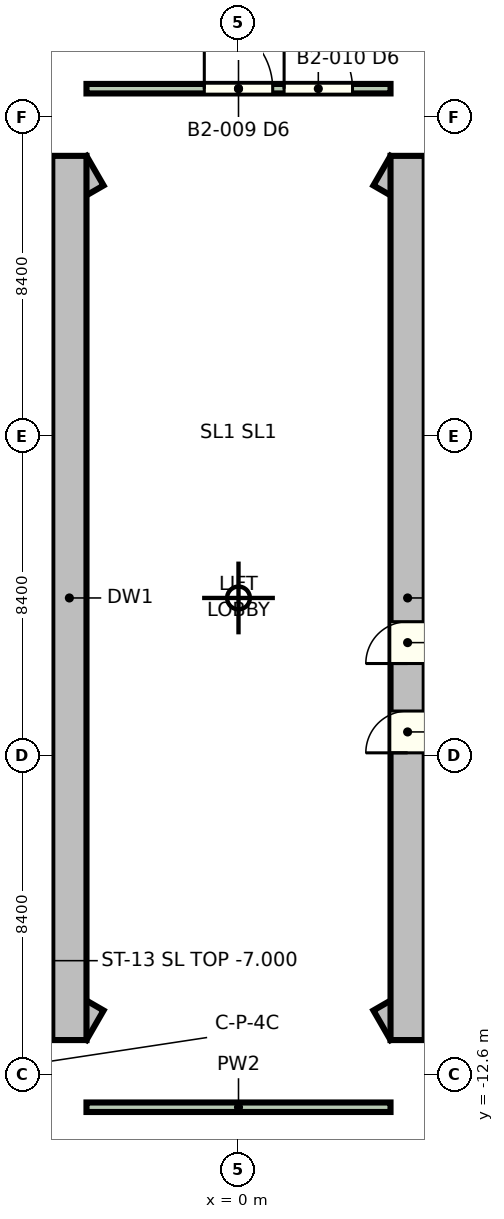
"""IFC4 building model, lengths in metres.
Left out: names, types, materials, properties, quantities, classifications, styles, units other than length and angle.
Written with IfcOpenShell. Run it as: python <this file> out.ifc"""

import sys

from ifc_helpers import new_model, si_unit, direction, frame, frame_2d, origin, place, context, subcontext, project, spatial, rectangle, extrude, element, fill, save


model = new_model("IFC4")
c1 = context("Model", 3, precision=1e-05, world=origin(), true_north=direction((0.0, 1.0)))
c2 = subcontext(c1, "Body", "Model", "MODEL_VIEW")
j1 = project(units=[si_unit("LENGTHUNIT", "METRE"), si_unit("PLANEANGLEUNIT", "RADIAN")], contexts=[c1])
p1 = place(None, origin())
s1 = spatial("IfcSite", under=j1, at=p1, CompositionType="ELEMENT")
p2 = place(p1, origin())
s2 = spatial("IfcBuilding", under=s1, at=p2, CompositionType="ELEMENT")
p3 = place(p2, frame((0.0, 0.0, -9.0)))
s3 = spatial("IfcBuildingStorey", under=s2, at=p3, CompositionType="ELEMENT", Elevation=-9.0)
for number, where, z_axis, x_axis in (
    (1, (-3.775, -11.243, 0.0), (0.0, 0.0, 1.0), (-0.866, 0.5, 0.0)),
    (2, (-8.614, 8.449, 0.0), (0.0, 0.0, 1.0), (0.866, 0.5, 0.0)),
):
    element("IfcWall", number, at=place(p3, frame(where, z_axis=z_axis, x_axis=x_axis)), inside=s3, PredefinedType="SHEAR", context=c2, shape_type="SweptSolid", body=[
        extrude(rectangle(XDim=5.587, YDim=0.9, at=frame_2d((2.794, 0.0))), origin(), (0.0, 0.0, 1.0), 3.7),
    ])
p4 = place(p3, frame((-4.45, 11.633, 0.0), z_axis=(0.0, 0.0, 1.0), x_axis=(0.0, -1.0, 0.0)))
e3 = element("IfcWall", 3, at=p4, inside=s3, PredefinedType="SHEAR", context=c2, shape_type="SweptSolid", body=[
    extrude(rectangle(XDim=23.265, YDim=0.9, at=frame_2d((11.633, 0.0))), origin(), (0.0, 0.0, 1.0), 3.7),
])
for number, where, z_axis, x_axis in (
    (4, (3.775, 11.243, 0.0), (0.0, 0.0, 1.0), (0.866, -0.5, 0.0)),
    (5, (8.614, -8.449, 0.0), (0.0, 0.0, 1.0), (-0.866, -0.5, 0.0)),
):
    element("IfcWall", number, at=place(p3, frame(where, z_axis=z_axis, x_axis=x_axis)), inside=s3, PredefinedType="SHEAR", context=c2, shape_type="SweptSolid", body=[
        extrude(rectangle(XDim=5.587, YDim=0.9, at=frame_2d((2.794, 0.0))), origin(), (0.0, 0.0, 1.0), 3.7),
    ])
p5 = place(p3, frame((4.45, -11.633, 0.0), z_axis=(0.0, 0.0, 1.0), x_axis=(0.0, 1.0, 0.0)))
e6 = element("IfcWall", 6, at=p5, inside=s3, PredefinedType="SHEAR", context=c2, shape_type="SweptSolid", body=[
    extrude(rectangle(XDim=23.265, YDim=0.9, at=frame_2d((11.633, 0.0))), origin(), (0.0, 0.0, 1.0), 3.7),
])
p6 = place(p5, frame((7.558, 0.0, 0.0)))
e7 = element("IfcOpeningElement", 7, at=p6, cuts=e6, PredefinedType="OPENING", context=c2, shape_type="SweptSolid", body=[
    extrude(rectangle(XDim=1.1, YDim=2.1, at=frame_2d((0.55, 1.05))), frame((0.0, 0.46, 0.0), z_axis=(0.0, -1.0, 0.0), x_axis=(1.0, 0.0, 0.0)), (0.0, 0.0, 1.0), 0.92),
])
p7 = place(p5, frame((9.907, 0.0, 0.0)))
e8 = element("IfcOpeningElement", 8, at=p7, cuts=e6, PredefinedType="OPENING", context=c2, shape_type="SweptSolid", body=[
    extrude(rectangle(XDim=1.1, YDim=2.1, at=frame_2d((0.55, 1.05))), frame((0.0, 0.46, 0.0), z_axis=(0.0, -1.0, 0.0), x_axis=(1.0, 0.0, 0.0)), (0.0, 0.0, 1.0), 0.92),
])
p8 = place(p3, frame((-4.0, 13.4, 0.0), z_axis=(0.0, 0.0, 1.0), x_axis=(1.0, 0.0, 0.0)))
e9 = element("IfcWall", 9, at=p8, inside=s3, PredefinedType="PARTITIONING", context=c2, shape_type="SweptSolid", body=[
    extrude(rectangle(XDim=8.0, YDim=0.25, at=frame_2d((4.0, 0.0))), origin(), (0.0, 0.0, 1.0), 3.7),
])
p9 = place(p8, frame((3.1, 0.0, 0.0)))
e10 = element("IfcOpeningElement", 10, at=p9, cuts=e9, PredefinedType="OPENING", context=c2, shape_type="SweptSolid", body=[
    extrude(rectangle(XDim=1.8, YDim=2.1, at=frame_2d((0.9, 1.05))), frame((0.0, 0.135, 0.0), z_axis=(0.0, -1.0, 0.0), x_axis=(1.0, 0.0, 0.0)), (0.0, 0.0, 1.0), 0.27),
])
p10 = place(p8, frame((5.2, 0.0, 0.0)))
e11 = element("IfcOpeningElement", 11, at=p10, cuts=e9, PredefinedType="OPENING", context=c2, shape_type="SweptSolid", body=[
    extrude(rectangle(XDim=1.8, YDim=2.1, at=frame_2d((0.9, 1.05))), frame((0.0, 0.135, 0.0), z_axis=(0.0, -1.0, 0.0), x_axis=(1.0, 0.0, 0.0)), (0.0, 0.0, 1.0), 0.27),
])
p11 = place(p3, frame((-4.0, -13.4, 0.0), z_axis=(0.0, 0.0, 1.0), x_axis=(1.0, 0.0, 0.0)))
e12 = element("IfcWall", 12, at=p11, inside=s3, PredefinedType="PARTITIONING", context=c2, shape_type="SweptSolid", body=[
    extrude(rectangle(XDim=8.0, YDim=0.25, at=frame_2d((4.0, 0.0))), origin(), (0.0, 0.0, 1.0), 3.7),
])
p12 = place(p6, origin())
e13 = element("IfcDoor", 13, at=p12, inside=s3, OperationType="SLIDING_TO_LEFT", PredefinedType="DOOR", context=c2, shape_type="SweptSolid", body=[
    extrude(rectangle(XDim=1.1, YDim=2.1, at=frame_2d((0.55, 1.05))), frame((0.0, 0.025, 0.0), z_axis=(0.0, -1.0, 0.0), x_axis=(1.0, 0.0, 0.0)), (0.0, 0.0, 1.0), 0.05),
])
fill(e7, e13)
p13 = place(p7, origin())
e14 = element("IfcDoor", 14, at=p13, inside=s3, OperationType="SLIDING_TO_LEFT", PredefinedType="DOOR", context=c2, shape_type="SweptSolid", body=[
    extrude(rectangle(XDim=1.1, YDim=2.1, at=frame_2d((0.55, 1.05))), frame((0.0, 0.025, 0.0), z_axis=(0.0, -1.0, 0.0), x_axis=(1.0, 0.0, 0.0)), (0.0, 0.0, 1.0), 0.05),
])
fill(e8, e14)
p14 = place(p9, origin())
e15 = element("IfcDoor", 15, at=p14, inside=s3, OperationType="DOUBLE_DOOR_SINGLE_SWING", PredefinedType="DOOR", context=c2, shape_type="SweptSolid", body=[
    extrude(rectangle(XDim=1.8, YDim=2.1, at=frame_2d((0.9, 1.05))), frame((0.0, 0.025, 0.0), z_axis=(0.0, -1.0, 0.0), x_axis=(1.0, 0.0, 0.0)), (0.0, 0.0, 1.0), 0.05),
])
fill(e10, e15)
p15 = place(p10, origin())
e16 = element("IfcDoor", 16, at=p15, inside=s3, OperationType="DOUBLE_DOOR_SINGLE_SWING", PredefinedType="DOOR", context=c2, shape_type="SweptSolid", body=[
    extrude(rectangle(XDim=1.8, YDim=2.1, at=frame_2d((0.9, 1.05))), frame((0.0, 0.025, 0.0), z_axis=(0.0, -1.0, 0.0), x_axis=(1.0, 0.0, 0.0)), (0.0, 0.0, 1.0), 0.05),
])
fill(e11, e16)
save(model, sys.argv[1])
